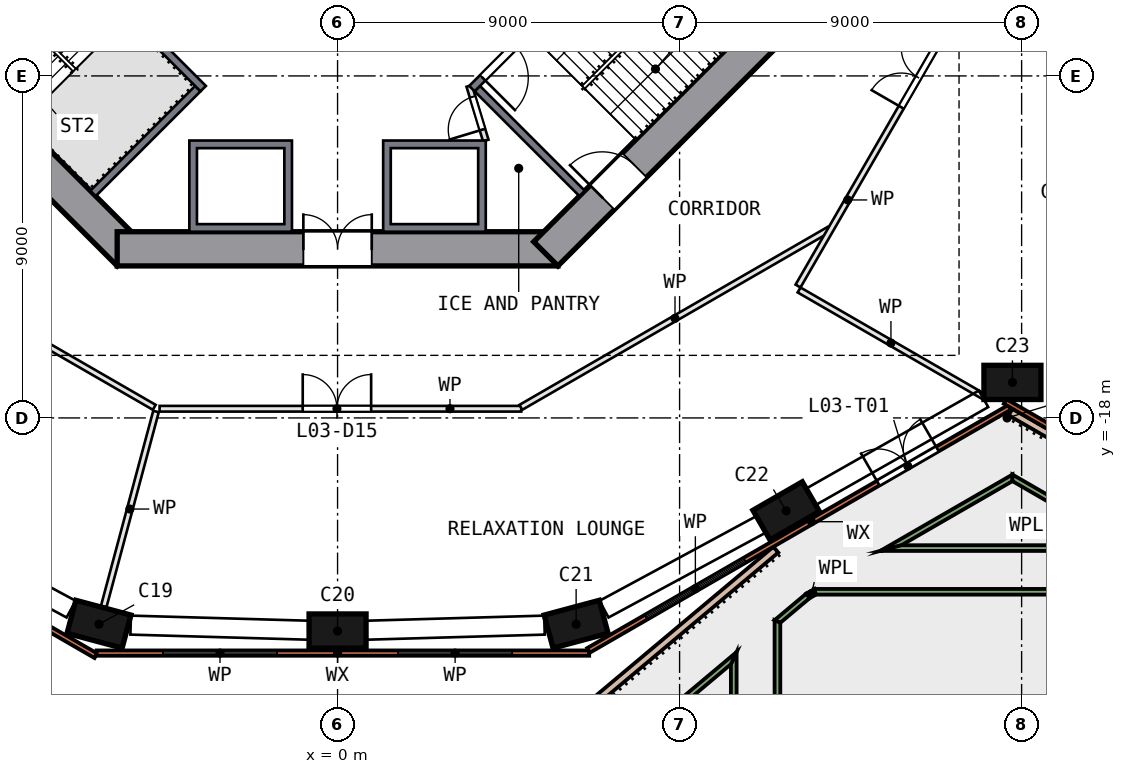
"""IFC4 building model, lengths in metres.
Left out: names, types, materials, properties, quantities, classifications, styles, units other than length and angle.
Written with IfcOpenShell. Run it as: python <this file> out.ifc"""

import sys

from ifc_helpers import new_model, si_unit, direction, frame, frame_2d, origin, origin_2d, place, context, subcontext, project, spatial, polyline, rectangle, outline, extrude, element, fill, save


model = new_model("IFC4")
c1 = context("Model", 3, precision=1e-05, world=origin(), true_north=direction((0.0, 1.0)))
c2 = subcontext(c1, "Body", "Model", "MODEL_VIEW")
j1 = project(units=[si_unit("LENGTHUNIT", "METRE"), si_unit("PLANEANGLEUNIT", "RADIAN")], contexts=[c1])
p1 = place(None, origin())
s1 = spatial("IfcSite", under=j1, at=p1, CompositionType="ELEMENT")
p2 = place(p1, origin())
s2 = spatial("IfcBuilding", under=s1, at=p2, CompositionType="ELEMENT")
p3 = place(p2, frame((0.0, 0.0, 19.0)))
s3 = spatial("IfcBuildingStorey", under=s2, at=p3, CompositionType="ELEMENT", Elevation=19.0)
for number, where, z_axis, x_axis in (
    (1, (-6.278, -23.428, 0.0), (0.0, 0.0, 1.0), (-0.966, 0.259, 0.0)),
    (2, (0.0, -23.608, 0.0), (0.0, 0.0, 1.0), (1.0, 0.0, 0.0)),
    (3, (6.278, -23.428, 0.0), (0.0, 0.0, 1.0), (-0.966, -0.259, 0.0)),
    (4, (11.804, -20.445, 0.0), (0.0, 0.0, 1.0), (0.866, 0.5, 0.0)),
    (5, (17.758, -17.065, 0.0), (0.0, 0.0, 1.0), (-1.0, 0.0, 0.0)),
):
    element("IfcColumn", number, at=place(p3, frame(where, z_axis=z_axis, x_axis=x_axis)), inside=s3, PredefinedType="COLUMN", context=c2, shape_type="SweptSolid", body=[
        extrude(rectangle(XDim=1.5, YDim=0.9, at=origin_2d()), origin(), (0.0, 0.0, 1.0), 4.05),
    ])
p4 = place(p3, frame((-13.682, -5.481, 0.0), z_axis=(0.0, 0.0, 1.0), x_axis=(0.707106781, -0.707106781, 0.0)))
e6 = element("IfcWall", 6, at=p4, inside=s3, PredefinedType="SHEAR", context=c2, shape_type="SweptSolid", body=[
    extrude(rectangle(XDim=11.598, YDim=0.9, at=frame_2d((5.799, 0.0))), origin(), (0.0, 0.0, 1.0), 4.5),
])
p5 = place(p4, frame((2.099, 0.0, 0.0)))
e7 = element("IfcOpeningElement", 7, at=p5, cuts=e6, PredefinedType="OPENING", context=c2, shape_type="SweptSolid", body=[
    extrude(rectangle(XDim=1.2, YDim=2.1, at=frame_2d((0.6, 1.05))), frame((0.0, 0.46, 0.0), z_axis=(0.0, -1.0, 0.0), x_axis=(1.0, 0.0, 0.0)), (0.0, 0.0, 1.0), 0.92),
])
p6 = place(p3, frame((-5.799, -13.55, 0.0), z_axis=(0.0, 0.0, 1.0), x_axis=(1.0, 0.0, 0.0)))
e8 = element("IfcWall", 8, at=p6, inside=s3, PredefinedType="SHEAR", context=c2, shape_type="SweptSolid", body=[
    extrude(rectangle(XDim=11.598, YDim=0.9, at=frame_2d((5.799, 0.0))), origin(), (0.0, 0.0, 1.0), 4.5),
])
p7 = place(p6, frame((4.899, 0.0, 0.0)))
e9 = element("IfcOpeningElement", 9, at=p7, cuts=e8, PredefinedType="OPENING", context=c2, shape_type="SweptSolid", body=[
    extrude(rectangle(XDim=1.8, YDim=2.1, at=frame_2d((0.9, 1.05))), frame((0.0, 0.46, 0.0), z_axis=(0.0, -1.0, 0.0), x_axis=(1.0, 0.0, 0.0)), (0.0, 0.0, 1.0), 0.92),
])
p8 = place(p3, frame((5.481, -13.682, 0.0), z_axis=(0.0, 0.0, 1.0), x_axis=(0.707106781, 0.707106781, 0.0)))
e10 = element("IfcWall", 10, at=p8, inside=s3, PredefinedType="SHEAR", context=c2, shape_type="SweptSolid", body=[
    extrude(rectangle(XDim=11.598, YDim=0.9, at=frame_2d((5.799, 0.0))), origin(), (0.0, 0.0, 1.0), 4.5),
])
p9 = place(p8, frame((2.099, 0.0, 0.0)))
e11 = element("IfcOpeningElement", 11, at=p9, cuts=e10, PredefinedType="OPENING", context=c2, shape_type="SweptSolid", body=[
    extrude(rectangle(XDim=1.2, YDim=2.1, at=frame_2d((0.6, 1.05))), frame((0.0, 0.46, 0.0), z_axis=(0.0, -1.0, 0.0), x_axis=(1.0, 0.0, 0.0)), (0.0, 0.0, 1.0), 0.92),
])
p10 = place(p3, frame((-17.828, -17.637, 0.0), z_axis=(0.0, 0.0, 1.0), x_axis=(0.866029009, -0.499993756, 0.0)))
e12 = element("IfcWall", 12, at=p10, inside=s3, PredefinedType="SOLIDWALL", context=c2, shape_type="SweptSolid", body=[
    extrude(rectangle(XDim=13.242, YDim=0.14, at=frame_2d((6.621, 0.0))), origin(), (0.0, 0.0, 1.0), 4.05),
])
p11 = place(p10, frame((1.46, 0.0, 0.9)))
e13 = element("IfcOpeningElement", 13, at=p11, cuts=e12, PredefinedType="OPENING", context=c2, shape_type="SweptSolid", body=[
    extrude(rectangle(XDim=3.6, YDim=2.4, at=frame_2d((1.8, 1.2))), frame((0.0, 0.08, 0.0), z_axis=(0.0, -1.0, 0.0), x_axis=(1.0, 0.0, 0.0)), (0.0, 0.0, 1.0), 0.16),
])
p12 = place(p10, frame((8.215, 0.0, 0.9)))
e14 = element("IfcOpeningElement", 14, at=p12, cuts=e12, PredefinedType="OPENING", context=c2, shape_type="SweptSolid", body=[
    extrude(rectangle(XDim=3.0, YDim=2.4, at=frame_2d((1.5, 1.2))), frame((0.0, 0.08, 0.0), z_axis=(0.0, -1.0, 0.0), x_axis=(1.0, 0.0, 0.0)), (0.0, 0.0, 1.0), 0.16),
])
p13 = place(p3, frame((-6.341, -24.188, 0.0), z_axis=(0.0, 0.0, 1.0), x_axis=(1.0, 0.0, 0.0)))
e15 = element("IfcWall", 15, at=p13, inside=s3, PredefinedType="SOLIDWALL", context=c2, shape_type="SweptSolid", body=[
    extrude(rectangle(XDim=12.962, YDim=0.14, at=frame_2d((6.481, 0.0))), origin(), (0.0, 0.0, 1.0), 4.05),
])
p14 = place(p13, frame((1.748, 0.0, 0.9)))
e16 = element("IfcOpeningElement", 16, at=p14, cuts=e15, PredefinedType="OPENING", context=c2, shape_type="SweptSolid", body=[
    extrude(rectangle(XDim=3.0, YDim=2.4, at=frame_2d((1.5, 1.2))), frame((0.0, 0.08, 0.0), z_axis=(0.0, -1.0, 0.0), x_axis=(1.0, 0.0, 0.0)), (0.0, 0.0, 1.0), 0.16),
])
p15 = place(p13, frame((7.935, 0.0, 0.9)))
e17 = element("IfcOpeningElement", 17, at=p15, cuts=e15, PredefinedType="OPENING", context=c2, shape_type="SweptSolid", body=[
    extrude(rectangle(XDim=3.0, YDim=2.4, at=frame_2d((1.5, 1.2))), frame((0.0, 0.08, 0.0), z_axis=(0.0, -1.0, 0.0), x_axis=(1.0, 0.0, 0.0)), (0.0, 0.0, 1.0), 0.16),
])
p16 = place(p3, frame((6.603, -24.118, 0.0), z_axis=(0.0, 0.0, 1.0), x_axis=(0.866023287, 0.500003667, 0.0)))
e18 = element("IfcWall", 18, at=p16, inside=s3, PredefinedType="SOLIDWALL", context=c2, shape_type="SweptSolid", body=[
    extrude(rectangle(XDim=12.801, YDim=0.14, at=frame_2d((6.4, 0.0))), origin(), (0.0, 0.0, 1.0), 4.05),
])
p17 = place(p16, frame((1.748, 0.0, 0.9)))
e19 = element("IfcOpeningElement", 19, at=p17, cuts=e18, PredefinedType="OPENING", context=c2, shape_type="SweptSolid", body=[
    extrude(rectangle(XDim=3.0, YDim=2.4, at=frame_2d((1.5, 1.2))), frame((0.0, 0.08, 0.0), z_axis=(0.0, -1.0, 0.0), x_axis=(1.0, 0.0, 0.0)), (0.0, 0.0, 1.0), 0.16),
])
p18 = place(p16, frame((8.802, 0.0, 0.0)))
e20 = element("IfcOpeningElement", 20, at=p18, cuts=e18, PredefinedType="OPENING", context=c2, shape_type="SweptSolid", body=[
    extrude(rectangle(XDim=1.8, YDim=2.4, at=frame_2d((0.9, 1.2))), frame((0.0, 0.08, 0.0), z_axis=(0.0, -1.0, 0.0), x_axis=(1.0, 0.0, 0.0)), (0.0, 0.0, 1.0), 0.16),
])
p19 = place(p3, frame((17.565, -17.566, 0.0), z_axis=(0.0, 0.0, 1.0), x_axis=(0.866028022, -0.499995465, 0.0)))
e21 = element("IfcWall", 21, at=p19, inside=s3, PredefinedType="SOLIDWALL", context=c2, shape_type="SweptSolid", body=[
    extrude(rectangle(XDim=11.405, YDim=0.14, at=frame_2d((5.702, 0.0))), origin(), (0.0, 0.0, 1.0), 4.05),
])
p20 = place(p19, frame((1.623, 0.0, 0.9)))
e22 = element("IfcOpeningElement", 22, at=p20, cuts=e21, PredefinedType="OPENING", context=c2, shape_type="SweptSolid", body=[
    extrude(rectangle(XDim=3.6, YDim=2.4, at=frame_2d((1.8, 1.2))), frame((0.0, 0.08, 0.0), z_axis=(0.0, -1.0, 0.0), x_axis=(1.0, 0.0, 0.0)), (0.0, 0.0, 1.0), 0.16),
])
p21 = place(p3, origin())
e23 = element("IfcWall", 23, at=p21, inside=s3, PredefinedType="SOLIDWALL", context=c2, shape_type="SweptSolid", body=[
    extrude(outline(polyline([(11.596, -21.543), (11.468, -21.39), (-1.772, -32.5), (-1.223, -32.3), (11.596, -21.543)])), origin(), (0.0, 0.0, 1.0), 0.45),
])
p22 = place(p3, origin())
e24 = element("IfcWall", 24, at=p22, inside=s3, PredefinedType="SOLIDWALL", context=c2, shape_type="SweptSolid", body=[
    extrude(outline(polyline([(27.179, -23.428), (27.407, -23.329), (17.758, -17.758), (17.658, -17.931), (27.179, -23.428)])), origin(), (0.0, 0.0, 1.0), 0.45),
])
p23 = place(p3, origin())
e25 = element("IfcWall", 25, at=p23, inside=s3, PredefinedType="SOLIDWALL", context=c2, shape_type="SweptSolid", body=[
    extrude(outline(polyline([(12.545, -22.5), (12.332, -22.624), (12.418, -22.747), (12.586, -22.65), (12.545, -22.5)])), origin(), (0.0, 0.0, 1.0), 0.6),
])
p24 = place(p3, origin())
e26 = element("IfcWall", 26, at=p24, inside=s3, PredefinedType="SOLIDWALL", context=c2, shape_type="SweptSolid", body=[
    extrude(outline(polyline([(12.332, -22.624), (11.5, -23.321), (11.65, -23.391), (12.418, -22.747), (12.332, -22.624)])), origin(), (0.0, 0.0, 1.0), 0.6),
])
p25 = place(p3, origin())
e27 = element("IfcWall", 27, at=p25, inside=s3, PredefinedType="SOLIDWALL", context=c2, shape_type="SweptSolid", body=[
    extrude(outline(polyline([(11.5, -23.321), (11.5, -31.0), (11.65, -30.85), (11.65, -23.391), (11.5, -23.321)])), origin(), (0.0, 0.0, 1.0), 0.6),
])
p26 = place(p3, origin())
e28 = element("IfcWall", 28, at=p26, inside=s3, PredefinedType="SOLIDWALL", context=c2, shape_type="SweptSolid", body=[
    extrude(outline(polyline([(21.5, -22.5), (12.545, -22.5), (12.586, -22.65), (21.35, -22.65), (21.5, -22.5)])), origin(), (0.0, 0.0, 1.0), 0.6),
])
p27 = place(p3, origin())
e29 = element("IfcWall", 29, at=p27, inside=s3, PredefinedType="SOLIDWALL", context=c2, shape_type="SweptSolid", body=[
    extrude(outline(polyline([(17.758, -19.49), (14.278, -21.5), (14.837, -21.35), (17.758, -19.664), (17.758, -19.49)])), origin(), (0.0, 0.0, 1.0), 0.6),
])
p28 = place(p3, origin())
e30 = element("IfcWall", 30, at=p28, inside=s3, PredefinedType="SOLIDWALL", context=c2, shape_type="SweptSolid", body=[
    extrude(outline(polyline([(14.278, -21.5), (21.239, -21.5), (20.679, -21.35), (14.837, -21.35), (14.278, -21.5)])), origin(), (0.0, 0.0, 1.0), 0.6),
])
p29 = place(p3, origin())
e31 = element("IfcWall", 31, at=p29, inside=s3, PredefinedType="SOLIDWALL", context=c2, shape_type="SweptSolid", body=[
    extrude(outline(polyline([(21.239, -21.5), (17.758, -19.49), (17.758, -19.664), (20.679, -21.35), (21.239, -21.5)])), origin(), (0.0, 0.0, 1.0), 0.6),
])
p30 = place(p3, origin())
e32 = element("IfcWall", 32, at=p30, inside=s3, PredefinedType="SOLIDWALL", context=c2, shape_type="SweptSolid", body=[
    extrude(outline(polyline([(10.5, -31.0), (10.5, -24.16), (10.35, -24.482), (10.35, -30.85), (10.5, -31.0)])), origin(), (0.0, 0.0, 1.0), 0.6),
])
p31 = place(p3, origin())
e33 = element("IfcWall", 33, at=p31, inside=s3, PredefinedType="SOLIDWALL", context=c2, shape_type="SweptSolid", body=[
    extrude(outline(polyline([(10.5, -24.16), (2.349, -31.0), (2.761, -30.85), (10.35, -24.482), (10.5, -24.16)])), origin(), (0.0, 0.0, 1.0), 0.6),
])
p32 = place(p3, origin())
e34 = element("IfcWall", 34, at=p32, inside=s3, PredefinedType="SOLIDWALL", context=c2, shape_type="SweptSolid", body=[
    extrude(outline(polyline([(-1.2, -13.1), (-3.9, -13.1), (-3.9, -10.7), (-1.2, -10.7), (-1.2, -13.1)]), holes=[polyline([(-3.7, -10.9), (-3.7, -12.9), (-1.4, -12.9), (-1.4, -10.9), (-3.7, -10.9)])]), origin(), (0.0, 0.0, 1.0), 4.05),
])
p33 = place(p3, origin())
e35 = element("IfcWall", 35, at=p33, inside=s3, PredefinedType="SOLIDWALL", context=c2, shape_type="SweptSolid", body=[
    extrude(outline(polyline([(3.9, -10.7), (3.9, -13.1), (1.2, -13.1), (1.2, -10.7), (3.9, -10.7)]), holes=[polyline([(1.4, -12.9), (3.7, -12.9), (3.7, -10.9), (1.4, -10.9), (1.4, -12.9)])]), origin(), (0.0, 0.0, 1.0), 4.05),
])
p34 = place(p3, frame((-3.535, -9.334, 0.0), z_axis=(0.0, 0.0, 1.0), x_axis=(-0.707106781, 0.707106781, 0.0)))
e36 = element("IfcWall", 36, at=p34, inside=s3, PredefinedType="SOLIDWALL", context=c2, shape_type="SweptSolid", body=[
    extrude(rectangle(XDim=8.2, YDim=0.2, at=frame_2d((4.1, 0.0))), origin(), (0.0, 0.0, 1.0), 4.05),
])
p35 = place(p34, frame((6.6, 0.0, 0.0)))
e37 = element("IfcOpeningElement", 37, at=p35, cuts=e36, PredefinedType="OPENING", context=c2, shape_type="SweptSolid", body=[
    extrude(rectangle(XDim=1.2, YDim=2.1, at=frame_2d((0.6, 1.05))), frame((0.0, 0.11, 0.0), z_axis=(0.0, -1.0, 0.0), x_axis=(1.0, 0.0, 0.0)), (0.0, 0.0, 1.0), 0.22),
])
p36 = place(p3, frame((-3.677, -9.334, 0.0), z_axis=(0.0, 0.0, 1.0), x_axis=(-0.707106781, -0.707106781, 0.0)))
e38 = element("IfcWall", 38, at=p36, inside=s3, PredefinedType="SOLIDWALL", context=c2, shape_type="SweptSolid", body=[
    extrude(rectangle(XDim=3.9, YDim=0.2, at=frame_2d((1.95, 0.0))), origin(), (0.0, 0.0, 1.0), 4.05),
])
p37 = place(p3, frame((9.334, -3.535, 0.0), z_axis=(0.0, 0.0, 1.0), x_axis=(-0.707106781, -0.707106781, 0.0)))
e39 = element("IfcWall", 39, at=p37, inside=s3, PredefinedType="SOLIDWALL", context=c2, shape_type="SweptSolid", body=[
    extrude(rectangle(XDim=8.2, YDim=0.2, at=frame_2d((4.1, 0.0))), origin(), (0.0, 0.0, 1.0), 4.05),
])
p38 = place(p37, frame((6.6, 0.0, 0.0)))
e40 = element("IfcOpeningElement", 40, at=p38, cuts=e39, PredefinedType="OPENING", context=c2, shape_type="SweptSolid", body=[
    extrude(rectangle(XDim=1.2, YDim=2.1, at=frame_2d((0.6, 1.05))), frame((0.0, 0.11, 0.0), z_axis=(0.0, -1.0, 0.0), x_axis=(1.0, 0.0, 0.0)), (0.0, 0.0, 1.0), 0.22),
])
p39 = place(p3, frame((3.677, -9.334, 0.0), z_axis=(0.0, 0.0, 1.0), x_axis=(0.707106781, -0.707106781, 0.0)))
e41 = element("IfcWall", 41, at=p39, inside=s3, PredefinedType="SOLIDWALL", context=c2, shape_type="SweptSolid", body=[
    extrude(rectangle(XDim=3.9, YDim=0.2, at=frame_2d((1.95, 0.0))), origin(), (0.0, 0.0, 1.0), 4.05),
])
p40 = place(p3, frame((3.9, -10.7, 0.0), z_axis=(0.0, 0.0, 1.0), x_axis=(-0.289808785, 0.957084567, 0.0)))
e42 = element("IfcWall", 42, at=p40, inside=s3, PredefinedType="PARTITIONING", context=c2, shape_type="SweptSolid", body=[
    extrude(rectangle(XDim=1.501, YDim=0.15, at=frame_2d((0.75, 0.0))), origin(), (0.0, 0.0, 1.0), 4.05),
])
p41 = place(p40, frame((0.301, 0.0, 0.0)))
e43 = element("IfcOpeningElement", 43, at=p41, cuts=e42, PredefinedType="OPENING", context=c2, shape_type="SweptSolid", body=[
    extrude(rectangle(XDim=0.9, YDim=2.1, at=frame_2d((0.45, 1.05))), frame((0.0, 0.085, 0.0), z_axis=(0.0, -1.0, 0.0), x_axis=(1.0, 0.0, 0.0)), (0.0, 0.0, 1.0), 0.17),
])
p42 = place(p3, frame((-6.153, -22.965, 0.0), z_axis=(0.0, 0.0, 1.0), x_axis=(0.258843233, 0.965919345, 0.0)))
e44 = element("IfcWall", 44, at=p42, inside=s3, PredefinedType="PARTITIONING", context=c2, shape_type="SweptSolid", body=[
    extrude(rectangle(XDim=5.315, YDim=0.15, at=frame_2d((2.657, 0.0))), origin(), (0.0, 0.0, 1.0), 4.05),
])
p43 = place(p3, frame((-4.823, -17.721, 0.0), z_axis=(0.0, 0.0, 1.0), x_axis=(-0.866037142, 0.499979668, 0.0)))
e45 = element("IfcWall", 45, at=p43, inside=s3, PredefinedType="PARTITIONING", context=c2, shape_type="SweptSolid", body=[
    extrude(rectangle(XDim=9.367, YDim=0.15, at=frame_2d((4.683, 0.0))), origin(), (0.0, 0.0, 1.0), 4.05),
])
p44 = place(p43, frame((3.75, 0.0, 0.0)))
e46 = element("IfcOpeningElement", 46, at=p44, cuts=e45, PredefinedType="OPENING", context=c2, shape_type="SweptSolid", body=[
    extrude(rectangle(XDim=1.8, YDim=2.1, at=frame_2d((0.9, 1.05))), frame((0.0, 0.085, 0.0), z_axis=(0.0, -1.0, 0.0), x_axis=(1.0, 0.0, 0.0)), (0.0, 0.0, 1.0), 0.17),
])
p45 = place(p3, frame((-4.683, -17.758, 0.0), z_axis=(0.0, 0.0, 1.0), x_axis=(1.0, 0.0, 0.0)))
e47 = element("IfcWall", 47, at=p45, inside=s3, PredefinedType="PARTITIONING", context=c2, shape_type="SweptSolid", body=[
    extrude(rectangle(XDim=9.517, YDim=0.15, at=frame_2d((4.758, 0.0))), origin(), (0.0, 0.0, 1.0), 4.05),
])
p46 = place(p45, frame((3.767, 0.0, 0.0)))
e48 = element("IfcOpeningElement", 48, at=p46, cuts=e47, PredefinedType="OPENING", context=c2, shape_type="SweptSolid", body=[
    extrude(rectangle(XDim=1.8, YDim=2.1, at=frame_2d((0.9, 1.05))), frame((0.0, 0.085, 0.0), z_axis=(0.0, -1.0, 0.0), x_axis=(1.0, 0.0, 0.0)), (0.0, 0.0, 1.0), 0.17),
])
p47 = place(p3, frame((12.144, -14.633, 0.0), z_axis=(0.0, 0.0, 1.0), x_axis=(0.866016603, -0.500015243, 0.0)))
e49 = element("IfcWall", 49, at=p47, inside=s3, PredefinedType="PARTITIONING", context=c2, shape_type="SweptSolid", body=[
    extrude(rectangle(XDim=5.582, YDim=0.15, at=frame_2d((2.791, 0.0))), origin(), (0.0, 0.0, 1.0), 4.05),
])
p48 = place(p3, frame((12.935, -13.038, 0.0), z_axis=(0.0, 0.0, 1.0), x_axis=(-0.866037142, -0.499979668, 0.0)))
e50 = element("IfcWall", 50, at=p48, inside=s3, PredefinedType="PARTITIONING", context=c2, shape_type="SweptSolid", body=[
    extrude(rectangle(XDim=9.367, YDim=0.15, at=frame_2d((4.683, 0.0))), origin(), (0.0, 0.0, 1.0), 4.05),
])
p49 = place(p3, frame((12.117, -14.53, 0.0), z_axis=(0.0, 0.0, 1.0), x_axis=(0.500001509, 0.866024532, 0.0)))
e51 = element("IfcWall", 51, at=p49, inside=s3, PredefinedType="PARTITIONING", context=c2, shape_type="SweptSolid", body=[
    extrude(rectangle(XDim=11.183, YDim=0.15, at=frame_2d((5.592, 0.0))), origin(), (0.0, 0.0, 1.0), 4.05),
])
p50 = place(p49, frame((5.433, 0.0, 0.0)))
e52 = element("IfcOpeningElement", 52, at=p50, cuts=e51, PredefinedType="OPENING", context=c2, shape_type="SweptSolid", body=[
    extrude(rectangle(XDim=1.8, YDim=2.1, at=frame_2d((0.9, 1.05))), frame((0.0, 0.085, 0.0), z_axis=(0.0, -1.0, 0.0), x_axis=(1.0, 0.0, 0.0)), (0.0, 0.0, 1.0), 0.17),
])
p51 = place(p14, origin())
e53 = element("IfcWindow", 53, at=p51, inside=s3, PartitioningType="SINGLE_PANEL", PredefinedType="WINDOW", context=c2, shape_type="SweptSolid", body=[
    extrude(rectangle(XDim=3.0, YDim=2.4, at=frame_2d((1.5, 1.2))), frame((0.0, 0.03, 0.0), z_axis=(0.0, -1.0, 0.0), x_axis=(1.0, 0.0, 0.0)), (0.0, 0.0, 1.0), 0.06),
])
fill(e16, e53)
p52 = place(p15, origin())
e54 = element("IfcWindow", 54, at=p52, inside=s3, PartitioningType="SINGLE_PANEL", PredefinedType="WINDOW", context=c2, shape_type="SweptSolid", body=[
    extrude(rectangle(XDim=3.0, YDim=2.4, at=frame_2d((1.5, 1.2))), frame((0.0, 0.03, 0.0), z_axis=(0.0, -1.0, 0.0), x_axis=(1.0, 0.0, 0.0)), (0.0, 0.0, 1.0), 0.06),
])
fill(e17, e54)
p53 = place(p17, origin())
e55 = element("IfcWindow", 55, at=p53, inside=s3, PartitioningType="SINGLE_PANEL", PredefinedType="WINDOW", context=c2, shape_type="SweptSolid", body=[
    extrude(rectangle(XDim=3.0, YDim=2.4, at=frame_2d((1.5, 1.2))), frame((0.0, 0.03, 0.0), z_axis=(0.0, -1.0, 0.0), x_axis=(1.0, 0.0, 0.0)), (0.0, 0.0, 1.0), 0.06),
])
fill(e19, e55)
p54 = place(p18, origin())
e56 = element("IfcDoor", 56, at=p54, inside=s3, OperationType="DOUBLE_DOOR_SINGLE_SWING", PredefinedType="DOOR", context=c2, shape_type="SweptSolid", body=[
    extrude(rectangle(XDim=1.8, YDim=2.4, at=frame_2d((0.9, 1.2))), frame((0.0, 0.025, 0.0), z_axis=(0.0, -1.0, 0.0), x_axis=(1.0, 0.0, 0.0)), (0.0, 0.0, 1.0), 0.05),
])
fill(e20, e56)
p55 = place(p38, origin())
e57 = element("IfcDoor", 57, at=p55, inside=s3, OperationType="SINGLE_SWING_RIGHT", PredefinedType="DOOR", context=c2, shape_type="SweptSolid", body=[
    extrude(rectangle(XDim=1.2, YDim=2.1, at=frame_2d((0.6, 1.05))), frame((0.0, 0.025, 0.0), z_axis=(0.0, -1.0, 0.0), x_axis=(1.0, 0.0, 0.0)), (0.0, 0.0, 1.0), 0.05),
])
fill(e40, e57)
p56 = place(p7, origin())
e58 = element("IfcDoor", 58, at=p56, inside=s3, OperationType="DOUBLE_DOOR_SINGLE_SWING", PredefinedType="DOOR", context=c2, shape_type="SweptSolid", body=[
    extrude(rectangle(XDim=1.8, YDim=2.1, at=frame_2d((0.9, 1.05))), frame((0.0, 0.025, 0.0), z_axis=(0.0, -1.0, 0.0), x_axis=(1.0, 0.0, 0.0)), (0.0, 0.0, 1.0), 0.05),
])
fill(e9, e58)
p57 = place(p9, origin())
e59 = element("IfcDoor", 59, at=p57, inside=s3, OperationType="SINGLE_SWING_LEFT", PredefinedType="DOOR", context=c2, shape_type="SweptSolid", body=[
    extrude(rectangle(XDim=1.2, YDim=2.1, at=frame_2d((0.6, 1.05))), frame((0.0, 0.025, 0.0), z_axis=(0.0, -1.0, 0.0), x_axis=(1.0, 0.0, 0.0)), (0.0, 0.0, 1.0), 0.05),
])
fill(e11, e59)
p58 = place(p41, origin())
e60 = element("IfcDoor", 60, at=p58, inside=s3, OperationType="SINGLE_SWING_LEFT", PredefinedType="DOOR", context=c2, shape_type="SweptSolid", body=[
    extrude(rectangle(XDim=0.9, YDim=2.1, at=frame_2d((0.45, 1.05))), frame((0.0, 0.025, 0.0), z_axis=(0.0, -1.0, 0.0), x_axis=(1.0, 0.0, 0.0)), (0.0, 0.0, 1.0), 0.05),
])
fill(e43, e60)
p59 = place(p46, origin())
e61 = element("IfcDoor", 61, at=p59, inside=s3, OperationType="DOUBLE_DOOR_SINGLE_SWING", PredefinedType="DOOR", context=c2, shape_type="SweptSolid", body=[
    extrude(rectangle(XDim=1.8, YDim=2.1, at=frame_2d((0.9, 1.05))), frame((0.0, 0.025, 0.0), z_axis=(0.0, -1.0, 0.0), x_axis=(1.0, 0.0, 0.0)), (0.0, 0.0, 1.0), 0.05),
])
fill(e48, e61)
p60 = place(p50, origin())
e62 = element("IfcDoor", 62, at=p60, inside=s3, OperationType="DOUBLE_DOOR_SINGLE_SWING", PredefinedType="DOOR", context=c2, shape_type="SweptSolid", body=[
    extrude(rectangle(XDim=1.8, YDim=2.1, at=frame_2d((0.9, 1.05))), frame((0.0, 0.025, 0.0), z_axis=(0.0, -1.0, 0.0), x_axis=(1.0, 0.0, 0.0)), (0.0, 0.0, 1.0), 0.05),
])
fill(e52, e62)
save(model, sys.argv[1])
